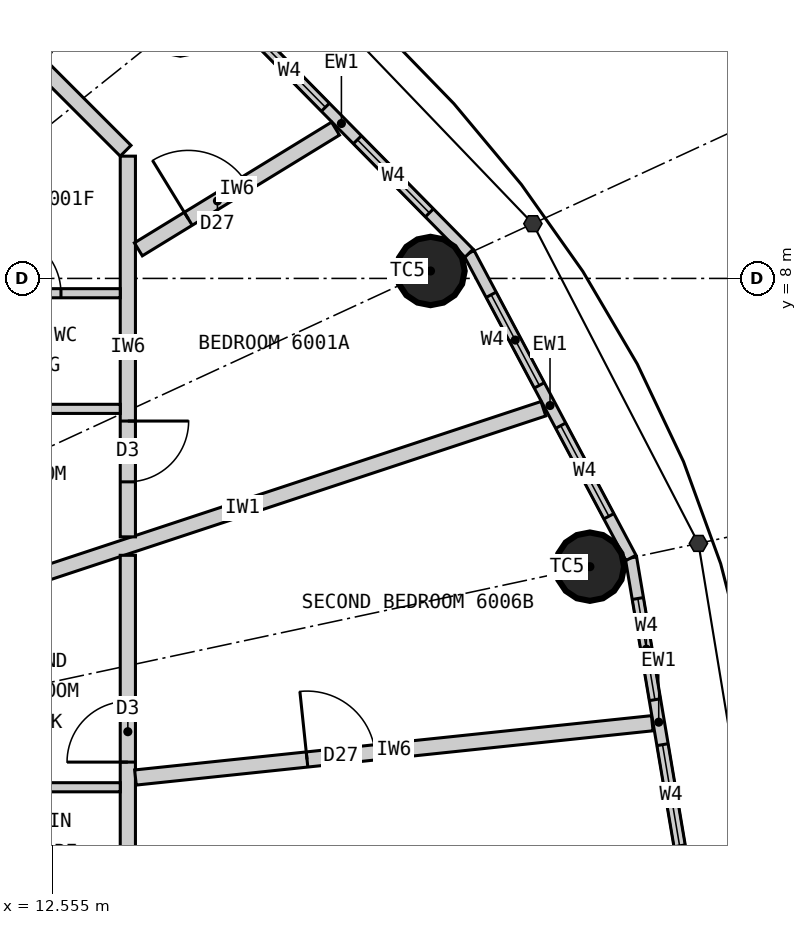
"""IFC4 building model, lengths in metres.
Left out: names, types, materials, properties, quantities, classifications, styles, units other than length and angle.
Written with IfcOpenShell. Run it as: python <this file> out.ifc"""

import sys

from ifc_helpers import new_model, si_unit, direction, frame, frame_2d, origin, origin_2d, place, context, subcontext, project, spatial, rectangle, circle, extrude, element, fill, save


model = new_model("IFC4")
c1 = context("Model", 3, precision=1e-05, world=origin(), true_north=direction((0.0, 1.0)))
c2 = subcontext(c1, "Body", "Model", "MODEL_VIEW")
j1 = project(units=[si_unit("LENGTHUNIT", "METRE"), si_unit("PLANEANGLEUNIT", "RADIAN")], contexts=[c1])
p1 = place(None, origin())
s1 = spatial("IfcSite", under=j1, at=p1, CompositionType="ELEMENT")
p2 = place(p1, origin())
s2 = spatial("IfcBuilding", under=s1, at=p2, CompositionType="ELEMENT")
p3 = place(p2, frame((0.0, 0.0, 222.6)))
s3 = spatial("IfcBuildingStorey", under=s2, at=p3, CompositionType="ELEMENT", Elevation=222.6)
for number, where, z_axis, x_axis in (
    (1, (19.629, 4.208, 0.0), (0.0, 0.0, 1.0), (1.0, 0.0, 0.0)),
    (2, (17.532, 8.098, 0.0), (0.0, 0.0, 1.0), (1.0, 0.0, 0.0)),
    (3, (14.241, 11.393, 0.0), (0.0, 0.0, 1.0), (1.0, 0.0, 0.0)),
):
    element("IfcColumn", number, at=place(p3, frame(where, z_axis=z_axis, x_axis=x_axis)), inside=s3, PredefinedType="COLUMN", context=c2, shape_type="SweptSolid", body=[
        extrude(circle(Radius=0.45, at=origin_2d()), origin(), (0.0, 0.0, 1.0), 3.3),
    ])
p4 = place(p3, frame((20.9, 0.0, 0.0), z_axis=(0.0, 0.0, 1.0), x_axis=(-0.166538513568, 0.986034950445, 0.0)))
e4 = element("IfcWall", 4, at=p4, inside=s3, PredefinedType="ELEMENTEDWALL", context=c2, shape_type="SweptSolid", body=[
    extrude(rectangle(XDim=4.385, YDim=0.15, at=frame_2d((2.192, 0.0))), origin(), (0.0, 0.0, 1.0), 3.12),
])
p5 = place(p4, frame((0.542, 0.0, 0.9)))
e5 = element("IfcOpeningElement", 5, at=p5, cuts=e4, PredefinedType="OPENING", context=c2, shape_type="SweptSolid", body=[
    extrude(rectangle(XDim=1.35, YDim=1.9, at=frame_2d((0.675, 0.95))), frame((0.0, 0.085, 0.0), z_axis=(0.0, -1.0, 0.0), x_axis=(1.0, 0.0, 0.0)), (0.0, 0.0, 1.0), 0.17),
])
p6 = place(p4, frame((2.492, 0.0, 0.9)))
e6 = element("IfcOpeningElement", 6, at=p6, cuts=e4, PredefinedType="OPENING", context=c2, shape_type="SweptSolid", body=[
    extrude(rectangle(XDim=1.35, YDim=1.9, at=frame_2d((0.675, 0.95))), frame((0.0, 0.085, 0.0), z_axis=(0.0, -1.0, 0.0), x_axis=(1.0, 0.0, 0.0)), (0.0, 0.0, 1.0), 0.17),
])
p7 = place(p3, frame((20.17, 4.323, 0.0), z_axis=(0.0, 0.0, 1.0), x_axis=(-0.469256152955, 0.883062094597, 0.0)))
e7 = element("IfcWall", 7, at=p7, inside=s3, PredefinedType="ELEMENTEDWALL", context=c2, shape_type="SweptSolid", body=[
    extrude(rectangle(XDim=4.539, YDim=0.15, at=frame_2d((2.27, 0.0))), origin(), (0.0, 0.0, 1.0), 3.12),
])
p8 = place(p7, frame((0.62, 0.0, 0.9)))
e8 = element("IfcOpeningElement", 8, at=p8, cuts=e7, PredefinedType="OPENING", context=c2, shape_type="SweptSolid", body=[
    extrude(rectangle(XDim=1.35, YDim=1.9, at=frame_2d((0.675, 0.95))), frame((0.0, 0.085, 0.0), z_axis=(0.0, -1.0, 0.0), x_axis=(1.0, 0.0, 0.0)), (0.0, 0.0, 1.0), 0.17),
])
p9 = place(p7, frame((2.57, 0.0, 0.9)))
e9 = element("IfcOpeningElement", 9, at=p9, cuts=e7, PredefinedType="OPENING", context=c2, shape_type="SweptSolid", body=[
    extrude(rectangle(XDim=1.35, YDim=1.9, at=frame_2d((0.675, 0.95))), frame((0.0, 0.085, 0.0), z_axis=(0.0, -1.0, 0.0), x_axis=(1.0, 0.0, 0.0)), (0.0, 0.0, 1.0), 0.17),
])
p10 = place(p3, frame((18.04, 8.332, 0.0), z_axis=(0.0, 0.0, 1.0), x_axis=(-0.701527379618, 0.712642501993, 0.0)))
e10 = element("IfcWall", 10, at=p10, inside=s3, PredefinedType="ELEMENTEDWALL", context=c2, shape_type="SweptSolid", body=[
    extrude(rectangle(XDim=4.788, YDim=0.15, at=frame_2d((2.394, 0.0))), origin(), (0.0, 0.0, 1.0), 3.12),
])
p11 = place(p10, frame((0.744, 0.0, 0.9)))
e11 = element("IfcOpeningElement", 11, at=p11, cuts=e10, PredefinedType="OPENING", context=c2, shape_type="SweptSolid", body=[
    extrude(rectangle(XDim=1.35, YDim=1.9, at=frame_2d((0.675, 0.95))), frame((0.0, 0.085, 0.0), z_axis=(0.0, -1.0, 0.0), x_axis=(1.0, 0.0, 0.0)), (0.0, 0.0, 1.0), 0.17),
])
p12 = place(p10, frame((2.694, 0.0, 0.9)))
e12 = element("IfcOpeningElement", 12, at=p12, cuts=e10, PredefinedType="OPENING", context=c2, shape_type="SweptSolid", body=[
    extrude(rectangle(XDim=1.35, YDim=1.9, at=frame_2d((0.675, 0.95))), frame((0.0, 0.085, 0.0), z_axis=(0.0, -1.0, 0.0), x_axis=(1.0, 0.0, 0.0)), (0.0, 0.0, 1.0), 0.17),
])
p13 = place(p3, frame((11.1, 3.669, 0.0), z_axis=(0.0, 0.0, 1.0), x_axis=(0.949476668397, 0.313837627079, 0.0)))
e13 = element("IfcWall", 13, at=p13, inside=s3, PredefinedType="PARTITIONING", context=c2, shape_type="SweptSolid", body=[
    extrude(rectangle(XDim=8.339, YDim=0.2, at=frame_2d((4.169, 0.0))), origin(), (0.0, 0.0, 1.0), 3.12),
])
p14 = place(p3, frame((13.55, 4.6, 0.0), z_axis=(0.0, 0.0, 1.0), x_axis=(0.0, 1.0, 0.0)))
e14 = element("IfcWall", 14, at=p14, inside=s3, PredefinedType="PARTITIONING", context=c2, shape_type="SweptSolid", body=[
    extrude(rectangle(XDim=5.009, YDim=0.2, at=frame_2d((2.504, 0.0))), origin(), (0.0, 0.0, 1.0), 3.12),
])
p15 = place(p14, frame((0.724, 0.0, 0.0)))
e15 = element("IfcOpeningElement", 15, at=p15, cuts=e14, PredefinedType="OPENING", context=c2, shape_type="SweptSolid", body=[
    extrude(rectangle(XDim=0.8, YDim=2.1, at=frame_2d((0.4, 1.05))), frame((0.0, 0.11, 0.0), z_axis=(0.0, -1.0, 0.0), x_axis=(1.0, 0.0, 0.0)), (0.0, 0.0, 1.0), 0.22),
])
p16 = place(p3, frame((13.521, 9.679, 0.0), z_axis=(0.0, 0.0, 1.0), x_axis=(-0.707106781187, 0.707106781187, 0.0)))
e16 = element("IfcWall", 16, at=p16, inside=s3, PredefinedType="PARTITIONING", context=c2, shape_type="SweptSolid", body=[
    extrude(rectangle(XDim=4.019, YDim=0.2, at=frame_2d((2.009, 0.0))), origin(), (0.0, 0.0, 1.0), 3.12),
])
p17 = place(p16, frame((1.57, 0.0, 0.0)))
e17 = element("IfcOpeningElement", 17, at=p17, cuts=e16, PredefinedType="OPENING", context=c2, shape_type="SweptSolid", body=[
    extrude(rectangle(XDim=0.9, YDim=2.1, at=frame_2d((0.45, 1.05))), frame((0.0, 0.11, 0.0), z_axis=(0.0, -1.0, 0.0), x_axis=(1.0, 0.0, 0.0)), (0.0, 0.0, 1.0), 0.22),
])
p18 = place(p3, frame((13.688, 8.382, 0.0), z_axis=(0.0, 0.0, 1.0), x_axis=(0.852783459586, 0.522264656144, 0.0)))
e18 = element("IfcWall", 18, at=p18, inside=s3, PredefinedType="PARTITIONING", context=c2, shape_type="SweptSolid", body=[
    extrude(rectangle(XDim=3.042, YDim=0.2, at=frame_2d((1.521, 0.0))), origin(), (0.0, 0.0, 1.0), 3.12),
])
p19 = place(p18, frame((0.77, 0.0, 0.0)))
e19 = element("IfcOpeningElement", 19, at=p19, cuts=e18, PredefinedType="OPENING", context=c2, shape_type="SweptSolid", body=[
    extrude(rectangle(XDim=0.9, YDim=2.1, at=frame_2d((0.45, 1.05))), frame((0.0, 0.11, 0.0), z_axis=(0.0, -1.0, 0.0), x_axis=(1.0, 0.0, 0.0)), (0.0, 0.0, 1.0), 0.22),
])
p20 = place(p3, frame((11.1, 6.284, 0.0), z_axis=(0.0, 0.0, 1.0), x_axis=(1.0, 0.0, 0.0)))
e20 = element("IfcWall", 20, at=p20, inside=s3, PredefinedType="PARTITIONING", context=c2, shape_type="SweptSolid", body=[
    extrude(rectangle(XDim=2.35, YDim=0.12, at=frame_2d((1.175, 0.0))), origin(), (0.0, 0.0, 1.0), 3.12),
])
p21 = place(p3, frame((11.1, 7.805, 0.0), z_axis=(0.0, 0.0, 1.0), x_axis=(1.0, 0.0, 0.0)))
e21 = element("IfcWall", 21, at=p21, inside=s3, PredefinedType="PARTITIONING", context=c2, shape_type="SweptSolid", body=[
    extrude(rectangle(XDim=2.35, YDim=0.12, at=frame_2d((1.175, 0.0))), origin(), (0.0, 0.0, 1.0), 3.12),
])
p22 = place(p21, frame((0.77, 0.0, 0.0)))
e22 = element("IfcOpeningElement", 22, at=p22, cuts=e21, PredefinedType="OPENING", context=c2, shape_type="SweptSolid", body=[
    extrude(rectangle(XDim=0.8, YDim=2.1, at=frame_2d((0.4, 1.05))), frame((0.0, 0.07, 0.0), z_axis=(0.0, -1.0, 0.0), x_axis=(1.0, 0.0, 0.0)), (0.0, 0.0, 1.0), 0.14),
])
p23 = place(p3, frame((13.55, -8.139, 0.0), z_axis=(0.0, 0.0, 1.0), x_axis=(0.0, 1.0, 0.0)))
e23 = element("IfcWall", 23, at=p23, inside=s3, PredefinedType="PARTITIONING", context=c2, shape_type="SweptSolid", body=[
    extrude(rectangle(XDim=12.496, YDim=0.2, at=frame_2d((6.248, 0.0))), origin(), (0.0, 0.0, 1.0), 3.12),
])
p24 = place(p23, frame((2.42, 0.0, 0.0)))
e24 = element("IfcOpeningElement", 24, at=p24, cuts=e23, PredefinedType="OPENING", context=c2, shape_type="SweptSolid", body=[
    extrude(rectangle(XDim=0.8, YDim=2.1, at=frame_2d((0.4, 1.05))), frame((0.0, 0.11, 0.0), z_axis=(0.0, -1.0, 0.0), x_axis=(1.0, 0.0, 0.0)), (0.0, 0.0, 1.0), 0.22),
])
p25 = place(p23, frame((9.776, 0.0, 0.0)))
e25 = element("IfcOpeningElement", 25, at=p25, cuts=e23, PredefinedType="OPENING", context=c2, shape_type="SweptSolid", body=[
    extrude(rectangle(XDim=0.8, YDim=2.1, at=frame_2d((0.4, 1.05))), frame((0.0, 0.11, 0.0), z_axis=(0.0, -1.0, 0.0), x_axis=(1.0, 0.0, 0.0)), (0.0, 0.0, 1.0), 0.22),
])
p26 = place(p23, frame((5.82, 0.0, 0.0)))
e26 = element("IfcOpeningElement", 26, at=p26, cuts=e23, PredefinedType="OPENING", context=c2, shape_type="SweptSolid", body=[
    extrude(rectangle(XDim=0.9, YDim=2.1, at=frame_2d((0.45, 1.05))), frame((0.0, 0.11, 0.0), z_axis=(0.0, -1.0, 0.0), x_axis=(1.0, 0.0, 0.0)), (0.0, 0.0, 1.0), 0.22),
])
p27 = place(p3, frame((13.65, 1.434, 0.0), z_axis=(0.0, 0.0, 1.0), x_axis=(0.994526954268, 0.10448031984, 0.0)))
e27 = element("IfcWall", 27, at=p27, inside=s3, PredefinedType="PARTITIONING", context=c2, shape_type="SweptSolid", body=[
    extrude(rectangle(XDim=6.837, YDim=0.2, at=frame_2d((3.418, 0.0))), origin(), (0.0, 0.0, 1.0), 2.47),
])
p28 = place(p27, frame((2.27, 0.0, 0.0)))
e28 = element("IfcOpeningElement", 28, at=p28, cuts=e27, PredefinedType="OPENING", context=c2, shape_type="SweptSolid", body=[
    extrude(rectangle(XDim=0.9, YDim=2.1, at=frame_2d((0.45, 1.05))), frame((0.0, 0.11, 0.0), z_axis=(0.0, -1.0, 0.0), x_axis=(1.0, 0.0, 0.0)), (0.0, 0.0, 1.0), 0.22),
])
p29 = place(p3, frame((11.1, 1.306, 0.0), z_axis=(0.0, 0.0, 1.0), x_axis=(1.0, 0.0, 0.0)))
e29 = element("IfcWall", 29, at=p29, inside=s3, PredefinedType="PARTITIONING", context=c2, shape_type="SweptSolid", body=[
    extrude(rectangle(XDim=2.35, YDim=0.12, at=frame_2d((1.175, 0.0))), origin(), (0.0, 0.0, 1.0), 3.12),
])
p30 = place(p5, origin())
e30 = element("IfcWindow", 30, at=p30, inside=s3, PartitioningType="SINGLE_PANEL", PredefinedType="WINDOW", context=c2, shape_type="SweptSolid", body=[
    extrude(rectangle(XDim=1.35, YDim=1.9, at=frame_2d((0.675, 0.95))), frame((0.0, 0.03, 0.0), z_axis=(0.0, -1.0, 0.0), x_axis=(1.0, 0.0, 0.0)), (0.0, 0.0, 1.0), 0.06),
])
fill(e5, e30)
p31 = place(p6, origin())
e31 = element("IfcWindow", 31, at=p31, inside=s3, PartitioningType="SINGLE_PANEL", PredefinedType="WINDOW", context=c2, shape_type="SweptSolid", body=[
    extrude(rectangle(XDim=1.35, YDim=1.9, at=frame_2d((0.675, 0.95))), frame((0.0, 0.03, 0.0), z_axis=(0.0, -1.0, 0.0), x_axis=(1.0, 0.0, 0.0)), (0.0, 0.0, 1.0), 0.06),
])
fill(e6, e31)
p32 = place(p8, origin())
e32 = element("IfcWindow", 32, at=p32, inside=s3, PartitioningType="SINGLE_PANEL", PredefinedType="WINDOW", context=c2, shape_type="SweptSolid", body=[
    extrude(rectangle(XDim=1.35, YDim=1.9, at=frame_2d((0.675, 0.95))), frame((0.0, 0.03, 0.0), z_axis=(0.0, -1.0, 0.0), x_axis=(1.0, 0.0, 0.0)), (0.0, 0.0, 1.0), 0.06),
])
fill(e8, e32)
p33 = place(p9, origin())
e33 = element("IfcWindow", 33, at=p33, inside=s3, PartitioningType="SINGLE_PANEL", PredefinedType="WINDOW", context=c2, shape_type="SweptSolid", body=[
    extrude(rectangle(XDim=1.35, YDim=1.9, at=frame_2d((0.675, 0.95))), frame((0.0, 0.03, 0.0), z_axis=(0.0, -1.0, 0.0), x_axis=(1.0, 0.0, 0.0)), (0.0, 0.0, 1.0), 0.06),
])
fill(e9, e33)
p34 = place(p11, origin())
e34 = element("IfcWindow", 34, at=p34, inside=s3, PartitioningType="SINGLE_PANEL", PredefinedType="WINDOW", context=c2, shape_type="SweptSolid", body=[
    extrude(rectangle(XDim=1.35, YDim=1.9, at=frame_2d((0.675, 0.95))), frame((0.0, 0.03, 0.0), z_axis=(0.0, -1.0, 0.0), x_axis=(1.0, 0.0, 0.0)), (0.0, 0.0, 1.0), 0.06),
])
fill(e11, e34)
p35 = place(p12, origin())
e35 = element("IfcWindow", 35, at=p35, inside=s3, PartitioningType="SINGLE_PANEL", PredefinedType="WINDOW", context=c2, shape_type="SweptSolid", body=[
    extrude(rectangle(XDim=1.35, YDim=1.9, at=frame_2d((0.675, 0.95))), frame((0.0, 0.03, 0.0), z_axis=(0.0, -1.0, 0.0), x_axis=(1.0, 0.0, 0.0)), (0.0, 0.0, 1.0), 0.06),
])
fill(e12, e35)
p36 = place(p15, origin())
e36 = element("IfcDoor", 36, at=p36, inside=s3, OperationType="SINGLE_SWING_RIGHT", PredefinedType="DOOR", context=c2, shape_type="SweptSolid", body=[
    extrude(rectangle(XDim=0.8, YDim=2.1, at=frame_2d((0.4, 1.05))), frame((0.0, 0.025, 0.0), z_axis=(0.0, -1.0, 0.0), x_axis=(1.0, 0.0, 0.0)), (0.0, 0.0, 1.0), 0.05),
])
fill(e15, e36)
p37 = place(p22, origin())
e37 = element("IfcDoor", 37, at=p37, inside=s3, OperationType="SINGLE_SWING_LEFT", PredefinedType="DOOR", context=c2, shape_type="SweptSolid", body=[
    extrude(rectangle(XDim=0.8, YDim=2.1, at=frame_2d((0.4, 1.05))), frame((0.0, 0.025, 0.0), z_axis=(0.0, -1.0, 0.0), x_axis=(1.0, 0.0, 0.0)), (0.0, 0.0, 1.0), 0.05),
])
fill(e22, e37)
p38 = place(p19, origin())
e38 = element("IfcDoor", 38, at=p38, inside=s3, OperationType="SINGLE_SWING_LEFT", PredefinedType="DOOR", context=c2, shape_type="SweptSolid", body=[
    extrude(rectangle(XDim=0.9, YDim=2.1, at=frame_2d((0.45, 1.05))), frame((0.0, 0.025, 0.0), z_axis=(0.0, -1.0, 0.0), x_axis=(1.0, 0.0, 0.0)), (0.0, 0.0, 1.0), 0.05),
])
fill(e19, e38)
p39 = place(p25, origin())
e39 = element("IfcDoor", 39, at=p39, inside=s3, OperationType="SINGLE_SWING_LEFT", PredefinedType="DOOR", context=c2, shape_type="SweptSolid", body=[
    extrude(rectangle(XDim=0.8, YDim=2.1, at=frame_2d((0.4, 1.05))), frame((0.0, 0.025, 0.0), z_axis=(0.0, -1.0, 0.0), x_axis=(1.0, 0.0, 0.0)), (0.0, 0.0, 1.0), 0.05),
])
fill(e25, e39)
p40 = place(p28, origin())
e40 = element("IfcDoor", 40, at=p40, inside=s3, OperationType="SINGLE_SWING_LEFT", PredefinedType="DOOR", context=c2, shape_type="SweptSolid", body=[
    extrude(rectangle(XDim=0.9, YDim=2.1, at=frame_2d((0.45, 1.05))), frame((0.0, 0.025, 0.0), z_axis=(0.0, -1.0, 0.0), x_axis=(1.0, 0.0, 0.0)), (0.0, 0.0, 1.0), 0.05),
])
fill(e28, e40)
save(model, sys.argv[1])
